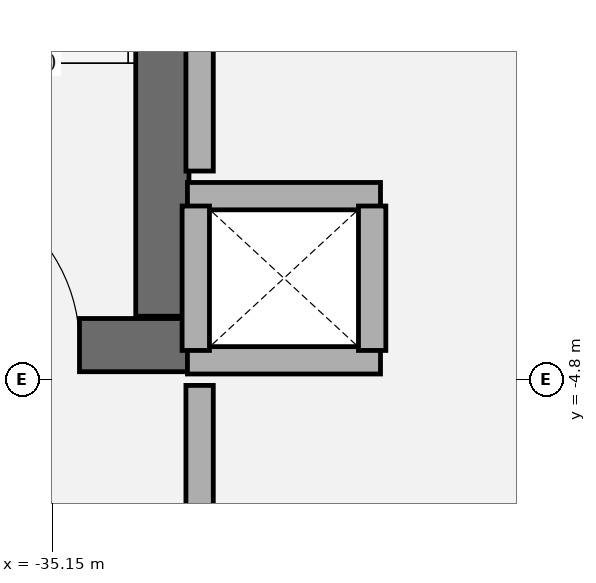
"""IFC4 building model, lengths in metres.
Left out: names, types, materials, properties, quantities, classifications, styles, units other than length and angle.
Written with IfcOpenShell. Run it as: python <this file> out.ifc"""

import sys

from ifc_helpers import new_model, si_unit, direction, frame, frame_2d, origin, place, context, subcontext, project, spatial, rectangle, extrude, element, fill, save


model = new_model("IFC4")
c1 = context("Model", 3, precision=1e-05, world=origin(), true_north=direction((0.0, 1.0)))
c2 = subcontext(c1, "Body", "Model", "MODEL_VIEW")
j1 = project(units=[si_unit("LENGTHUNIT", "METRE"), si_unit("PLANEANGLEUNIT", "RADIAN")], contexts=[c1])
p1 = place(None, origin())
s1 = spatial("IfcSite", under=j1, at=p1, CompositionType="ELEMENT")
p2 = place(p1, origin())
s2 = spatial("IfcBuilding", under=s1, at=p2, CompositionType="ELEMENT")
p3 = place(p2, frame((0.0, 0.0, 49.2)))
s3 = spatial("IfcBuildingStorey", under=s2, at=p3, CompositionType="ELEMENT", Elevation=49.2)
p4 = place(p3, frame((-38.46, -4.575, 0.0), z_axis=(0.0, 0.0, 1.0), x_axis=(1.0, 0.0, 0.0)))
e1 = element("IfcWall", 1, at=p4, inside=s3, PredefinedType="SHEAR", context=c2, shape_type="SweptSolid", body=[
    extrude(rectangle(XDim=4.21, YDim=0.35, at=frame_2d((2.105, 0.0))), origin(), (0.0, 0.0, 1.0), 3.92),
])
p5 = place(p4, frame((2.39, 0.0, 0.0)))
e2 = element("IfcOpeningElement", 2, at=p5, cuts=e1, PredefinedType="OPENING", context=c2, shape_type="SweptSolid", body=[
    extrude(rectangle(XDim=1.1, YDim=2.2, at=frame_2d((0.55, 1.1))), frame((0.0, 0.185, 0.0), z_axis=(0.0, -1.0, 0.0), x_axis=(1.0, 0.0, 0.0)), (0.0, 0.0, 1.0), 0.37),
])
p6 = place(p3, frame((-34.425, -4.385, 0.0), z_axis=(0.0, 0.0, 1.0), x_axis=(0.0, 1.0, 0.0)))
e3 = element("IfcWall", 3, at=p6, inside=s3, PredefinedType="SHEAR", context=c2, shape_type="SweptSolid", body=[
    extrude(rectangle(XDim=8.77, YDim=0.35, at=frame_2d((4.385, 0.0))), origin(), (0.0, 0.0, 1.0), 3.92),
])
for number, where, z_axis, x_axis in (
    (4, (-32.99, -4.675, 0.0), (0.0, 0.0, 1.0), (-1.0, 0.0, 0.0)),
    (5, (-34.26, -3.595, 0.0), (0.0, 0.0, 1.0), (1.0, 0.0, 0.0)),
):
    element("IfcWall", number, at=place(p3, frame(where, z_axis=z_axis, x_axis=x_axis)), inside=s3, PredefinedType="PARTITIONING", context=c2, shape_type="SweptSolid", body=[
        extrude(rectangle(XDim=1.27, YDim=0.18, at=frame_2d((0.635, 0.0))), origin(), (0.0, 0.0, 1.0), 3.92),
    ])
for number, where, z_axis, x_axis in (
    (6, (-34.205, -4.61, 0.0), (0.0, 0.0, 1.0), (0.0, 1.0, 0.0)),
    (7, (-33.045, -3.66, 0.0), (0.0, 0.0, 1.0), (0.0, -1.0, 0.0)),
):
    element("IfcWall", number, at=place(p3, frame(where, z_axis=z_axis, x_axis=x_axis)), inside=s3, PredefinedType="PARTITIONING", context=c2, shape_type="SweptSolid", body=[
        extrude(rectangle(XDim=0.95, YDim=0.18, at=frame_2d((0.475, 0.0))), origin(), (0.0, 0.0, 1.0), 3.92),
    ])
p7 = place(p3, frame((-34.18, -1.625, 0.0), z_axis=(0.0, 0.0, 1.0), x_axis=(0.0, -1.0, 0.0)))
e8 = element("IfcWall", 8, at=p7, inside=s3, PredefinedType="PARTITIONING", context=c2, shape_type="SweptSolid", body=[
    extrude(rectangle(XDim=1.805, YDim=0.18, at=frame_2d((0.902, 0.0))), origin(), (0.0, 0.0, 1.0), 3.92),
])
p8 = place(p3, frame((-34.18, -4.84, 0.0), z_axis=(0.0, 0.0, 1.0), x_axis=(0.0, -1.0, 0.0)))
e9 = element("IfcWall", 9, at=p8, inside=s3, PredefinedType="PARTITIONING", context=c2, shape_type="SweptSolid", body=[
    extrude(rectangle(XDim=3.485, YDim=0.18, at=frame_2d((1.743, 0.0))), origin(), (0.0, 0.0, 1.0), 3.92),
])
p9 = place(p8, frame((1.302, 0.0, 0.0)))
e10 = element("IfcOpeningElement", 10, at=p9, cuts=e9, PredefinedType="OPENING", context=c2, shape_type="SweptSolid", body=[
    extrude(rectangle(XDim=0.88, YDim=2.1, at=frame_2d((0.44, 1.05))), frame((0.0, 0.1, 0.0), z_axis=(0.0, -1.0, 0.0), x_axis=(1.0, 0.0, 0.0)), (0.0, 0.0, 1.0), 0.2),
])
p10 = place(p5, origin())
e11 = element("IfcDoor", 11, at=p10, inside=s3, OperationType="SINGLE_SWING_LEFT", PredefinedType="DOOR", context=c2, shape_type="SweptSolid", body=[
    extrude(rectangle(XDim=1.1, YDim=2.2, at=frame_2d((0.55, 1.1))), frame((0.0, 0.025, 0.0), z_axis=(0.0, -1.0, 0.0), x_axis=(1.0, 0.0, 0.0)), (0.0, 0.0, 1.0), 0.05),
])
fill(e2, e11)
save(model, sys.argv[1])
